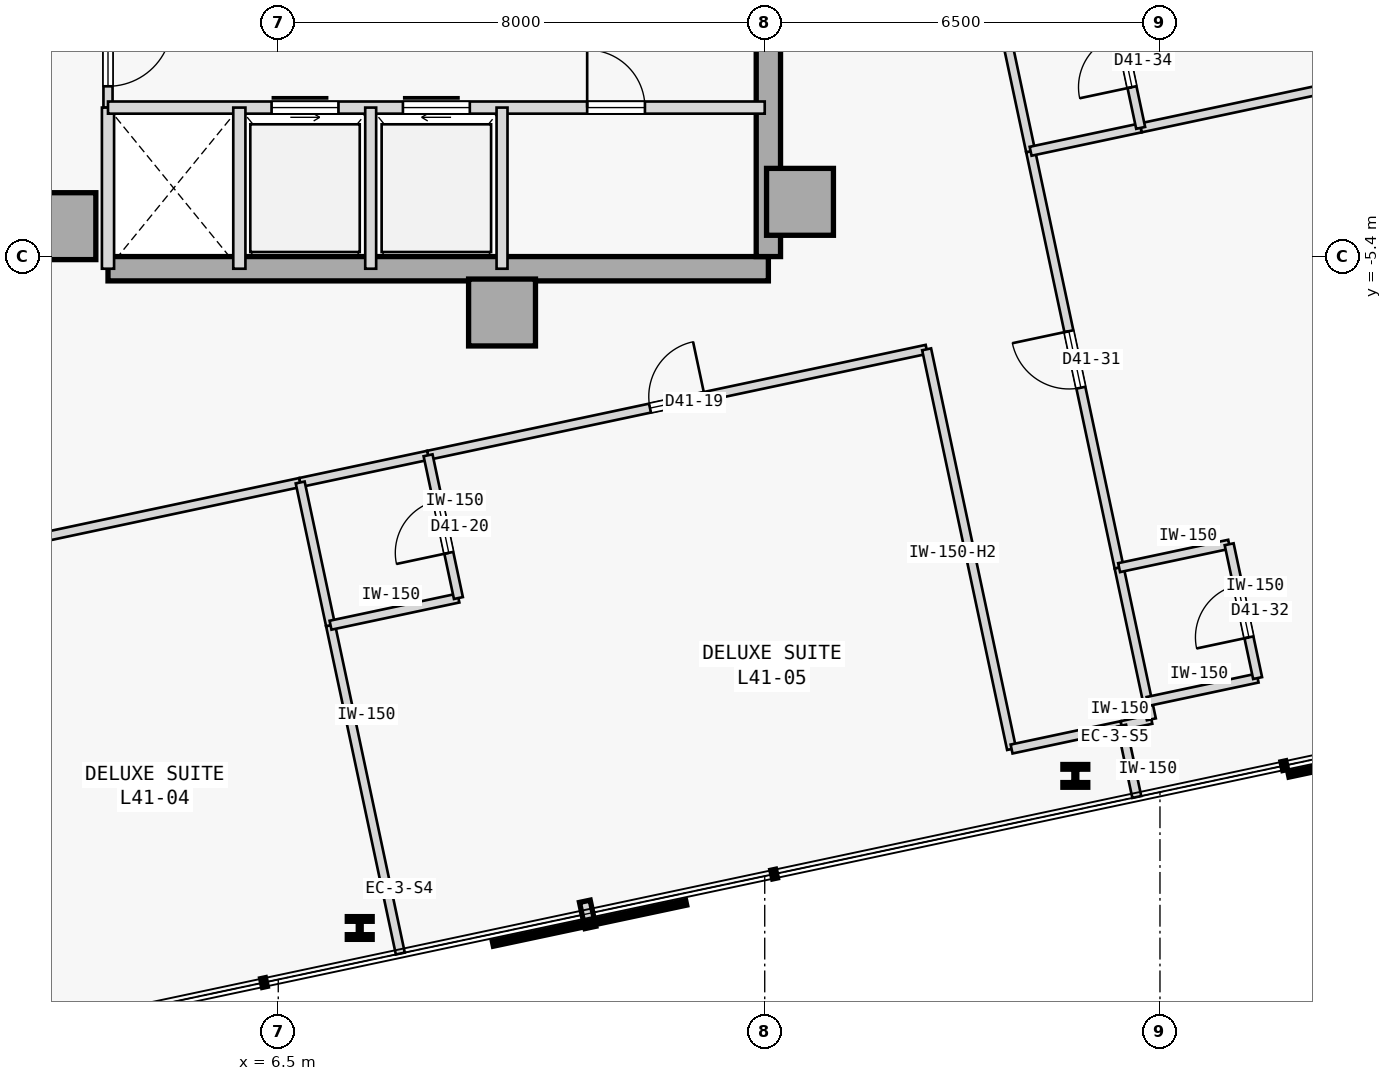
"""IFC4 building model, lengths in metres.
Left out: names, types, materials, properties, quantities, classifications, styles, units other than length and angle.
Written with IfcOpenShell. Run it as: python <this file> out.ifc"""

import sys

from ifc_helpers import new_model, si_unit, direction, frame, frame_2d, origin, origin_2d, place, context, subcontext, project, spatial, rectangle, i_section, extrude, element, fill, save


model = new_model("IFC4")
c1 = context("Model", 3, precision=1e-05, world=origin(), true_north=direction((0.0, 1.0)))
c2 = subcontext(c1, "Body", "Model", "MODEL_VIEW")
j1 = project(units=[si_unit("LENGTHUNIT", "METRE"), si_unit("PLANEANGLEUNIT", "RADIAN")], contexts=[c1])
p1 = place(None, origin())
s1 = spatial("IfcSite", under=j1, at=p1, CompositionType="ELEMENT")
p2 = place(p1, origin())
s2 = spatial("IfcBuilding", under=s1, at=p2, CompositionType="ELEMENT")
p3 = place(p2, frame((0.0, 0.0, 161.6)))
s3 = spatial("IfcBuildingStorey", under=s2, at=p3, CompositionType="ELEMENT", Elevation=161.6)
for number, where, z_axis, x_axis in (
    (1, (15.08, -4.5, 0.0), (0.0, 0.0, 1.0), (1.0, 0.0, 0.0)),
    (2, (10.18, -6.32, 0.0), (0.0, 0.0, 1.0), (1.0, 0.0, 0.0)),
    (3, (2.95, -4.9, 0.0), (0.0, 0.0, 1.0), (1.0, 0.0, 0.0)),
):
    element("IfcColumn", number, at=place(p3, frame(where, z_axis=z_axis, x_axis=x_axis)), inside=s3, PredefinedType="COLUMN", context=c2, shape_type="SweptSolid", body=[
        extrude(rectangle(XDim=1.1, YDim=1.1, at=origin_2d()), origin(), (0.0, 0.0, 1.0), 3.4),
    ])
p4 = place(p3, frame((3.7, -5.6, 0.0), z_axis=(0.0, 0.0, 1.0), x_axis=(1.0, 0.0, 0.0)))
e4 = element("IfcWall", 4, at=p4, inside=s3, PredefinedType="SHEAR", context=c2, shape_type="SweptSolid", body=[
    extrude(rectangle(XDim=10.86, YDim=0.4, at=frame_2d((5.43, 0.0))), origin(), (0.0, 0.0, 1.0), 3.175),
])
p5 = place(p3, frame((14.56, -5.4, 0.0), z_axis=(0.0, 0.0, 1.0), x_axis=(0.0, 1.0, 0.0)))
e5 = element("IfcWall", 5, at=p5, inside=s3, PredefinedType="SHEAR", context=c2, shape_type="SweptSolid", body=[
    extrude(rectangle(XDim=10.8, YDim=0.4, at=frame_2d((5.4, 0.0))), origin(), (0.0, 0.0, 1.0), 3.175),
])
for number, where, z_axis, x_axis in (
    (6, (7.84, -16.441, 0.0), (0.0, 0.0, 1.0), (1.0, 0.0, 0.0)),
    (7, (19.608, -13.94, 0.0), (0.0, 0.0, 1.0), (1.0, 0.0, 0.0)),
):
    element("IfcColumn", number, at=place(p3, frame(where, z_axis=z_axis, x_axis=x_axis)), inside=s3, PredefinedType="COLUMN", context=c2, shape_type="SweptSolid", body=[
        extrude(i_section(OverallWidth=0.409, OverallDepth=0.374, WebThickness=0.048, FlangeThickness=0.077, FilletRadius=0.015, at=origin_2d()), origin(), (0.0, 0.0, 1.0), 3.4),
    ])
p6 = place(p3, frame((3.7, -2.95, 0.0), z_axis=(0.0, 0.0, 1.0), x_axis=(0.0, 1.0, 0.0)))
e8 = element("IfcWall", 8, at=p6, inside=s3, PredefinedType="PARTITIONING", context=c2, shape_type="SweptSolid", body=[
    extrude(rectangle(XDim=1.8, YDim=0.15, at=frame_2d((0.9, 0.0))), origin(), (0.0, 0.0, 1.0), 3.175),
])
p7 = place(p6, frame((0.35, 0.0, 0.0)))
e9 = element("IfcOpeningElement", 9, at=p7, cuts=e8, PredefinedType="OPENING", context=c2, shape_type="SweptSolid", body=[
    extrude(rectangle(XDim=1.05, YDim=2.18, at=frame_2d((0.525, 1.09))), frame((0.0, 0.085, 0.0), z_axis=(0.0, -1.0, 0.0), x_axis=(1.0, 0.0, 0.0)), (0.0, 0.0, 1.0), 0.17),
])
p8 = place(p3, frame((3.7, -5.6, 0.0), z_axis=(0.0, 0.0, 1.0), x_axis=(0.0, 1.0, 0.0)))
e10 = element("IfcWall", 10, at=p8, inside=s3, PredefinedType="STANDARD", context=c2, shape_type="SweptSolid", body=[
    extrude(rectangle(XDim=2.65, YDim=0.2, at=frame_2d((1.325, 0.0))), origin(), (0.0, 0.0, 1.0), 3.175),
])
p9 = place(p3, frame((3.7, -2.95, 0.0), z_axis=(0.0, 0.0, 1.0), x_axis=(1.0, 0.0, 0.0)))
e11 = element("IfcWall", 11, at=p9, inside=s3, PredefinedType="STANDARD", context=c2, shape_type="SweptSolid", body=[
    extrude(rectangle(XDim=10.8, YDim=0.2, at=frame_2d((5.4, 0.0))), origin(), (0.0, 0.0, 1.0), 3.175),
])
p10 = place(p9, frame((2.69, 0.0, 0.0)))
e12 = element("IfcOpeningElement", 12, at=p10, cuts=e11, PredefinedType="OPENING", context=c2, shape_type="SweptSolid", body=[
    extrude(rectangle(XDim=1.1, YDim=2.15, at=frame_2d((0.55, 1.075))), frame((0.0, 0.11, 0.0), z_axis=(0.0, -1.0, 0.0), x_axis=(1.0, 0.0, 0.0)), (0.0, 0.0, 1.0), 0.22),
])
p11 = place(p9, frame((4.85, 0.0, 0.0)))
e13 = element("IfcOpeningElement", 13, at=p11, cuts=e11, PredefinedType="OPENING", context=c2, shape_type="SweptSolid", body=[
    extrude(rectangle(XDim=1.1, YDim=2.15, at=frame_2d((0.55, 1.075))), frame((0.0, 0.11, 0.0), z_axis=(0.0, -1.0, 0.0), x_axis=(1.0, 0.0, 0.0)), (0.0, 0.0, 1.0), 0.22),
])
p12 = place(p9, frame((7.88, 0.0, 0.0)))
e14 = element("IfcOpeningElement", 14, at=p12, cuts=e11, PredefinedType="OPENING", context=c2, shape_type="SweptSolid", body=[
    extrude(rectangle(XDim=0.95, YDim=2.15, at=frame_2d((0.475, 1.075))), frame((0.0, 0.11, 0.0), z_axis=(0.0, -1.0, 0.0), x_axis=(1.0, 0.0, 0.0)), (0.0, 0.0, 1.0), 0.22),
])
p13 = place(p3, frame((5.86, -5.6, 0.0), z_axis=(0.0, 0.0, 1.0), x_axis=(0.0, 1.0, 0.0)))
e15 = element("IfcWall", 15, at=p13, inside=s3, PredefinedType="STANDARD", context=c2, shape_type="SweptSolid", body=[
    extrude(rectangle(XDim=2.65, YDim=0.2, at=frame_2d((1.325, 0.0))), origin(), (0.0, 0.0, 1.0), 3.175),
])
for number, where, z_axis, x_axis in (
    (16, (10.18, -5.6, 0.0), (0.0, 0.0, 1.0), (0.0, 1.0, 0.0)),
    (17, (8.02, -5.6, 0.0), (0.0, 0.0, 1.0), (0.0, 1.0, 0.0)),
):
    element("IfcWall", number, at=place(p3, frame(where, z_axis=z_axis, x_axis=x_axis)), inside=s3, PredefinedType="STANDARD", context=c2, shape_type="SweptSolid", body=[
        extrude(rectangle(XDim=2.65, YDim=0.18, at=frame_2d((1.325, 0.0))), origin(), (0.0, 0.0, 1.0), 3.175),
    ])
p14 = place(p3, frame((-3.148, -11.242, 0.0), z_axis=(0.0, 0.0, 1.0), x_axis=(0.978150238925, 0.207899278718, 0.0)))
e18 = element("IfcWall", 18, at=p14, inside=s3, PredefinedType="PARTITIONING", context=c2, shape_type="SweptSolid", body=[
    extrude(rectangle(XDim=10.232, YDim=0.15, at=frame_2d((5.116, 0.0))), origin(), (0.0, 0.0, 1.0), 3.175),
])
p15 = place(p14, frame((4.656, 0.0, 0.0)))
e19 = element("IfcOpeningElement", 19, at=p15, cuts=e18, PredefinedType="OPENING", context=c2, shape_type="SweptSolid", body=[
    extrude(rectangle(XDim=0.92, YDim=2.15, at=frame_2d((0.46, 1.075))), frame((0.0, 0.085, 0.0), z_axis=(0.0, -1.0, 0.0), x_axis=(1.0, 0.0, 0.0)), (0.0, 0.0, 1.0), 0.17),
])
p16 = place(p3, frame((8.964, -8.668, 0.0), z_axis=(0.0, 0.0, 1.0), x_axis=(0.978149300771, 0.20790369261, 0.0)))
e20 = element("IfcWall", 20, at=p16, inside=s3, PredefinedType="PARTITIONING", context=c2, shape_type="SweptSolid", body=[
    extrude(rectangle(XDim=8.382, YDim=0.15, at=frame_2d((4.191, 0.0))), origin(), (0.0, 0.0, 1.0), 3.175),
])
p17 = place(p16, frame((3.731, 0.0, 0.0)))
e21 = element("IfcOpeningElement", 21, at=p17, cuts=e20, PredefinedType="OPENING", context=c2, shape_type="SweptSolid", body=[
    extrude(rectangle(XDim=0.92, YDim=2.15, at=frame_2d((0.46, 1.075))), frame((0.0, 0.085, 0.0), z_axis=(0.0, -1.0, 0.0), x_axis=(1.0, 0.0, 0.0)), (0.0, 0.0, 1.0), 0.17),
])
p18 = place(p3, frame((18.56, -13.498, 0.0), z_axis=(0.0, 0.0, 1.0), x_axis=(-0.207888737749, 0.978152479278, 0.0)))
e22 = element("IfcWall", 22, at=p18, inside=s3, PredefinedType="PARTITIONING", context=c2, shape_type="SweptSolid", body=[
    extrude(rectangle(XDim=6.72, YDim=0.15, at=frame_2d((3.36, 0.0))), origin(), (0.0, 0.0, 1.0), 2.575),
])
p19 = place(p3, frame((18.56, -13.498, 0.0), z_axis=(0.0, 0.0, 1.0), x_axis=(0.978160192495, 0.207852442415, 0.0)))
e23 = element("IfcWall", 23, at=p19, inside=s3, PredefinedType="PARTITIONING", context=c2, shape_type="SweptSolid", body=[
    extrude(rectangle(XDim=1.85, YDim=0.15, at=frame_2d((0.925, 0.0))), origin(), (0.0, 0.0, 1.0), 3.175),
])
p20 = place(p3, frame((6.861, -9.115, 0.0), z_axis=(0.0, 0.0, 1.0), x_axis=(0.978146728319, 0.207915795165, 0.0)))
e24 = element("IfcWall", 24, at=p20, inside=s3, PredefinedType="PARTITIONING", context=c2, shape_type="SweptSolid", body=[
    extrude(rectangle(XDim=2.15, YDim=0.15, at=frame_2d((1.075, 0.0))), origin(), (0.0, 0.0, 1.0), 3.175),
])
p21 = place(p3, frame((20.369, -13.114, 0.0), z_axis=(0.0, 0.0, 1.0), x_axis=(0.978143962546, 0.207928806409, 0.0)))
e25 = element("IfcWall", 25, at=p21, inside=s3, PredefinedType="PARTITIONING", context=c2, shape_type="SweptSolid", body=[
    extrude(rectangle(XDim=0.5, YDim=0.15, at=frame_2d((0.25, 0.0))), origin(), (0.0, 0.0, 1.0), 3.175),
])
p22 = place(p3, frame((20.858, -13.01, 0.0), z_axis=(0.0, 0.0, 1.0), x_axis=(-0.208306395052, 0.978063620518, 0.0)))
e26 = element("IfcWall", 26, at=p22, inside=s3, PredefinedType="PARTITIONING", context=c2, shape_type="SweptSolid", body=[
    extrude(rectangle(XDim=0.3, YDim=0.15, at=frame_2d((0.15, 0.0))), origin(), (0.0, 0.0, 1.0), 3.175),
])
p23 = place(p3, frame((20.328, -10.515, 0.0), z_axis=(0.0, 0.0, 1.0), x_axis=(-0.207906726269, 0.978148655968, 0.0)))
e27 = element("IfcWall", 27, at=p23, inside=s3, PredefinedType="PARTITIONING", context=c2, shape_type="SweptSolid", body=[
    extrude(rectangle(XDim=7.0, YDim=0.15, at=frame_2d((3.5, 0.0))), origin(), (0.0, 0.0, 1.0), 3.175),
])
p24 = place(p23, frame((3.025, 0.0, 0.0)))
e28 = element("IfcOpeningElement", 28, at=p24, cuts=e27, PredefinedType="OPENING", context=c2, shape_type="SweptSolid", body=[
    extrude(rectangle(XDim=0.95, YDim=2.15, at=frame_2d((0.475, 1.075))), frame((0.0, 0.085, 0.0), z_axis=(0.0, -1.0, 0.0), x_axis=(1.0, 0.0, 0.0)), (0.0, 0.0, 1.0), 0.17),
])
for number, where, z_axis, x_axis in (
    (29, (20.796, -12.716, 0.0), (0.0, 0.0, 1.0), (-0.208, 0.978, 0.0)),
    (30, (18.873, -3.668, 0.0), (0.0, 0.0, 1.0), (-0.208, 0.978, 0.0)),
):
    element("IfcWall", number, at=place(p3, frame(where, z_axis=z_axis, x_axis=x_axis)), inside=s3, PredefinedType="PARTITIONING", context=c2, shape_type="SweptSolid", body=[
        extrude(rectangle(XDim=2.25, YDim=0.15, at=frame_2d((1.125, 0.0))), origin(), (0.0, 0.0, 1.0), 3.175),
    ])
p25 = place(p3, frame((8.507, -16.862, 0.0), z_axis=(0.0, 0.0, 1.0), x_axis=(-0.20791588359, 0.978146709523, 0.0)))
e31 = element("IfcWall", 31, at=p25, inside=s3, PredefinedType="PARTITIONING", context=c2, shape_type="SweptSolid", body=[
    extrude(rectangle(XDim=5.52, YDim=0.15, at=frame_2d((2.76, 0.0))), origin(), (0.0, 0.0, 1.0), 3.175),
])
p26 = place(p3, frame((7.36, -11.462, 0.0), z_axis=(0.0, 0.0, 1.0), x_axis=(-0.207937840262, 0.978142042133, 0.0)))
e32 = element("IfcWall", 32, at=p26, inside=s3, PredefinedType="PARTITIONING", context=c2, shape_type="SweptSolid", body=[
    extrude(rectangle(XDim=2.4, YDim=0.15, at=frame_2d((1.2, 0.0))), origin(), (0.0, 0.0, 1.0), 3.175),
])
p27 = place(p3, frame((7.36, -11.462, 0.0), z_axis=(0.0, 0.0, 1.0), x_axis=(0.978146728319, 0.207915795165, 0.0)))
e33 = element("IfcWall", 33, at=p27, inside=s3, PredefinedType="PARTITIONING", context=c2, shape_type="SweptSolid", body=[
    extrude(rectangle(XDim=2.15, YDim=0.15, at=frame_2d((1.075, 0.0))), origin(), (0.0, 0.0, 1.0), 3.175),
])
p28 = place(p3, frame((9.463, -11.015, 0.0), z_axis=(0.0, 0.0, 1.0), x_axis=(-0.207937840262, 0.978142042133, 0.0)))
e34 = element("IfcWall", 34, at=p28, inside=s3, PredefinedType="PARTITIONING", context=c2, shape_type="SweptSolid", body=[
    extrude(rectangle(XDim=2.4, YDim=0.15, at=frame_2d((1.2, 0.0))), origin(), (0.0, 0.0, 1.0), 3.175),
])
p29 = place(p28, frame((0.76, 0.0, 0.0)))
e35 = element("IfcOpeningElement", 35, at=p29, cuts=e34, PredefinedType="OPENING", context=c2, shape_type="SweptSolid", body=[
    extrude(rectangle(XDim=0.88, YDim=2.15, at=frame_2d((0.44, 1.075))), frame((0.0, 0.085, 0.0), z_axis=(0.0, -1.0, 0.0), x_axis=(1.0, 0.0, 0.0)), (0.0, 0.0, 1.0), 0.17),
])
p30 = place(p3, frame((20.619, -14.288, 0.0), z_axis=(0.0, 0.0, 1.0), x_axis=(-0.207917150959, 0.978146440129, 0.0)))
e36 = element("IfcWall", 36, at=p30, inside=s3, PredefinedType="PARTITIONING", context=c2, shape_type="SweptSolid", body=[
    extrude(rectangle(XDim=1.2, YDim=0.15, at=frame_2d((0.6, 0.0))), origin(), (0.0, 0.0, 1.0), 3.175),
])
for number, where, z_axis, x_axis in (
    (37, (20.796, -12.716, 0.0), (0.0, 0.0, 1.0), (0.978, 0.208, 0.0)),
    (38, (20.328, -10.515, 0.0), (0.0, 0.0, 1.0), (0.978, 0.208, 0.0)),
):
    element("IfcWall", number, at=place(p3, frame(where, z_axis=z_axis, x_axis=x_axis)), inside=s3, PredefinedType="PARTITIONING", context=c2, shape_type="SweptSolid", body=[
        extrude(rectangle(XDim=1.85, YDim=0.15, at=frame_2d((0.925, 0.0))), origin(), (0.0, 0.0, 1.0), 3.175),
    ])
p31 = place(p3, frame((22.605, -12.332, 0.0), z_axis=(0.0, 0.0, 1.0), x_axis=(-0.207891197838, 0.978151956427, 0.0)))
e39 = element("IfcWall", 39, at=p31, inside=s3, PredefinedType="PARTITIONING", context=c2, shape_type="SweptSolid", body=[
    extrude(rectangle(XDim=2.25, YDim=0.15, at=frame_2d((1.125, 0.0))), origin(), (0.0, 0.0, 1.0), 3.175),
])
p32 = place(p31, frame((0.685, 0.0, 0.0)))
e40 = element("IfcOpeningElement", 40, at=p32, cuts=e39, PredefinedType="OPENING", context=c2, shape_type="SweptSolid", body=[
    extrude(rectangle(XDim=0.88, YDim=2.15, at=frame_2d((0.44, 1.075))), frame((0.0, 0.085, 0.0), z_axis=(0.0, -1.0, 0.0), x_axis=(1.0, 0.0, 0.0)), (0.0, 0.0, 1.0), 0.17),
])
p33 = place(p3, frame((20.682, -3.284, 0.0), z_axis=(0.0, 0.0, 1.0), x_axis=(0.97814556055, 0.207921288896, 0.0)))
e41 = element("IfcWall", 41, at=p33, inside=s3, PredefinedType="PARTITIONING", context=c2, shape_type="SweptSolid", body=[
    extrude(rectangle(XDim=12.187, YDim=0.15, at=frame_2d((6.094, 0.0))), origin(), (0.0, 0.0, 1.0), 3.175),
])
p34 = place(p3, frame((18.873, -3.668, 0.0), z_axis=(0.0, 0.0, 1.0), x_axis=(0.978160192495, 0.207852442415, 0.0)))
e42 = element("IfcWall", 42, at=p34, inside=s3, PredefinedType="PARTITIONING", context=c2, shape_type="SweptSolid", body=[
    extrude(rectangle(XDim=1.85, YDim=0.15, at=frame_2d((0.925, 0.0))), origin(), (0.0, 0.0, 1.0), 3.175),
])
p35 = place(p3, frame((20.682, -3.284, 0.0), z_axis=(0.0, 0.0, 1.0), x_axis=(-0.207891197838, 0.978151956427, 0.0)))
e43 = element("IfcWall", 43, at=p35, inside=s3, PredefinedType="PARTITIONING", context=c2, shape_type="SweptSolid", body=[
    extrude(rectangle(XDim=2.25, YDim=0.15, at=frame_2d((1.125, 0.0))), origin(), (0.0, 0.0, 1.0), 3.175),
])
p36 = place(p35, frame((0.685, 0.0, 0.0)))
e44 = element("IfcOpeningElement", 44, at=p36, cuts=e43, PredefinedType="OPENING", context=c2, shape_type="SweptSolid", body=[
    extrude(rectangle(XDim=0.88, YDim=2.15, at=frame_2d((0.44, 1.075))), frame((0.0, 0.085, 0.0), z_axis=(0.0, -1.0, 0.0), x_axis=(1.0, 0.0, 0.0)), (0.0, 0.0, 1.0), 0.17),
])
p37 = place(p7, frame((1.05, 0.0, 0.0), z_axis=(0.0, 0.0, 1.0), x_axis=(-1.0, 0.0, 0.0)))
e45 = element("IfcDoor", 45, at=p37, inside=s3, OperationType="SINGLE_SWING_RIGHT", PredefinedType="DOOR", context=c2, shape_type="SweptSolid", body=[
    extrude(rectangle(XDim=1.05, YDim=2.18, at=frame_2d((0.525, 1.09))), frame((0.0, 0.025, 0.0), z_axis=(0.0, -1.0, 0.0), x_axis=(1.0, 0.0, 0.0)), (0.0, 0.0, 1.0), 0.05),
])
fill(e9, e45)
p38 = place(p10, origin())
e46 = element("IfcDoor", 46, at=p38, inside=s3, OperationType="SLIDING_TO_LEFT", PredefinedType="DOOR", context=c2, shape_type="SweptSolid", body=[
    extrude(rectangle(XDim=1.1, YDim=2.15, at=frame_2d((0.55, 1.075))), frame((0.0, 0.025, 0.0), z_axis=(0.0, -1.0, 0.0), x_axis=(1.0, 0.0, 0.0)), (0.0, 0.0, 1.0), 0.05),
])
fill(e12, e46)
p39 = place(p11, origin())
e47 = element("IfcDoor", 47, at=p39, inside=s3, OperationType="SLIDING_TO_RIGHT", PredefinedType="DOOR", context=c2, shape_type="SweptSolid", body=[
    extrude(rectangle(XDim=1.1, YDim=2.15, at=frame_2d((0.55, 1.075))), frame((0.0, 0.025, 0.0), z_axis=(0.0, -1.0, 0.0), x_axis=(1.0, 0.0, 0.0)), (0.0, 0.0, 1.0), 0.05),
])
fill(e13, e47)
p40 = place(p12, origin())
e48 = element("IfcDoor", 48, at=p40, inside=s3, OperationType="SINGLE_SWING_LEFT", PredefinedType="DOOR", context=c2, shape_type="SweptSolid", body=[
    extrude(rectangle(XDim=0.95, YDim=2.15, at=frame_2d((0.475, 1.075))), frame((0.0, 0.025, 0.0), z_axis=(0.0, -1.0, 0.0), x_axis=(1.0, 0.0, 0.0)), (0.0, 0.0, 1.0), 0.05),
])
fill(e14, e48)
p41 = place(p17, origin())
e49 = element("IfcDoor", 49, at=p41, inside=s3, OperationType="SINGLE_SWING_RIGHT", PredefinedType="DOOR", context=c2, shape_type="SweptSolid", body=[
    extrude(rectangle(XDim=0.92, YDim=2.15, at=frame_2d((0.46, 1.075))), frame((0.0, 0.025, 0.0), z_axis=(0.0, -1.0, 0.0), x_axis=(1.0, 0.0, 0.0)), (0.0, 0.0, 1.0), 0.05),
])
fill(e21, e49)
p42 = place(p29, origin())
e50 = element("IfcDoor", 50, at=p42, inside=s3, OperationType="SINGLE_SWING_LEFT", PredefinedType="DOOR", context=c2, shape_type="SweptSolid", body=[
    extrude(rectangle(XDim=0.88, YDim=2.15, at=frame_2d((0.44, 1.075))), frame((0.0, 0.025, 0.0), z_axis=(0.0, -1.0, 0.0), x_axis=(1.0, 0.0, 0.0)), (0.0, 0.0, 1.0), 0.05),
])
fill(e35, e50)
p43 = place(p24, origin())
e51 = element("IfcDoor", 51, at=p43, inside=s3, OperationType="SINGLE_SWING_RIGHT", PredefinedType="DOOR", context=c2, shape_type="SweptSolid", body=[
    extrude(rectangle(XDim=0.95, YDim=2.15, at=frame_2d((0.475, 1.075))), frame((0.0, 0.025, 0.0), z_axis=(0.0, -1.0, 0.0), x_axis=(1.0, 0.0, 0.0)), (0.0, 0.0, 1.0), 0.05),
])
fill(e28, e51)
p44 = place(p32, origin())
e52 = element("IfcDoor", 52, at=p44, inside=s3, OperationType="SINGLE_SWING_LEFT", PredefinedType="DOOR", context=c2, shape_type="SweptSolid", body=[
    extrude(rectangle(XDim=0.88, YDim=2.15, at=frame_2d((0.44, 1.075))), frame((0.0, 0.025, 0.0), z_axis=(0.0, -1.0, 0.0), x_axis=(1.0, 0.0, 0.0)), (0.0, 0.0, 1.0), 0.05),
])
fill(e40, e52)
p45 = place(p36, origin())
e53 = element("IfcDoor", 53, at=p45, inside=s3, OperationType="SINGLE_SWING_LEFT", PredefinedType="DOOR", context=c2, shape_type="SweptSolid", body=[
    extrude(rectangle(XDim=0.88, YDim=2.15, at=frame_2d((0.44, 1.075))), frame((0.0, 0.025, 0.0), z_axis=(0.0, -1.0, 0.0), x_axis=(1.0, 0.0, 0.0)), (0.0, 0.0, 1.0), 0.05),
])
fill(e44, e53)
save(model, sys.argv[1])
